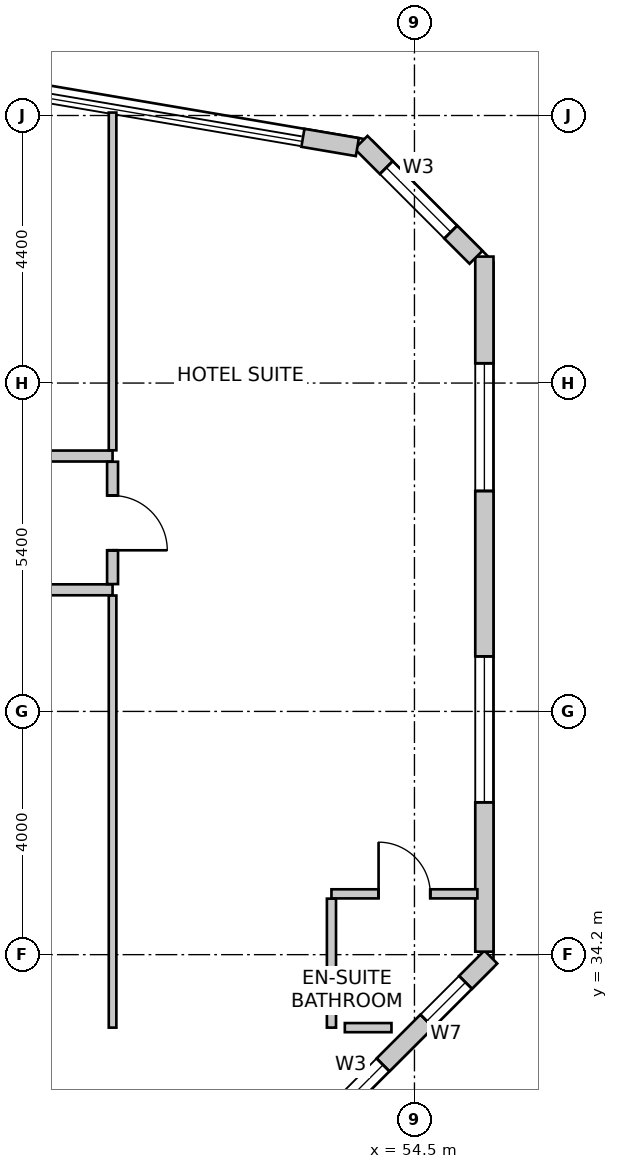
"""IFC4 building model, lengths in metres.
Left out: names, types, materials, properties, quantities, classifications, styles, units other than length and angle.
Written with IfcOpenShell. Run it as: python <this file> out.ifc"""

import sys

from ifc_helpers import new_model, si_unit, direction, frame, frame_2d, origin, place, context, subcontext, project, spatial, rectangle, extrude, source, transform, mapped, element, fill, save


model = new_model("IFC4")
c1 = context("Model", 3, precision=1e-05, world=origin(), true_north=direction((0.0, 1.0)))
c2 = subcontext(c1, "Body", "Model", "MODEL_VIEW")
j1 = project(units=[si_unit("LENGTHUNIT", "METRE"), si_unit("PLANEANGLEUNIT", "RADIAN")], contexts=[c1])
p1 = place(None, origin())
s1 = spatial("IfcSite", under=j1, at=p1, CompositionType="ELEMENT")
p2 = place(p1, origin())
s2 = spatial("IfcBuilding", under=s1, at=p2, CompositionType="ELEMENT")
p3 = place(p2, frame((0.0, 0.0, 153.8)))
s3 = spatial("IfcBuildingStorey", under=s2, at=p3, CompositionType="ELEMENT", Elevation=153.8)
p4 = place(p3, frame((52.476, 30.88, 0.0), z_axis=(0.0, 0.0, 1.0), x_axis=(0.707106781187, 0.707106781187, 0.0)))
e1 = element("IfcWall", 1, at=p4, inside=s3, PredefinedType="SOLIDWALL", context=c2, shape_type="SweptSolid", body=[
    extrude(rectangle(XDim=4.639, YDim=0.3, at=frame_2d((2.319, 0.0))), origin(), (0.0, 0.0, 1.0), 3.35),
])
m1 = source(origin(), c2, "Body", "SweptSolid", [
    extrude(rectangle(XDim=1.5, YDim=1.8, at=frame_2d((0.75, 0.9))), frame((0.0, 0.16, 0.0), z_axis=(0.0, -1.0, 0.0), x_axis=(1.0, 0.0, 0.0)), (0.0, 0.0, 1.0), 0.32),
])
p5 = place(p4, frame((0.632, 0.0, 0.85)))
e2 = element("IfcOpeningElement", 2, at=p5, cuts=e1, PredefinedType="OPENING", context=c2, shape_type="MappedRepresentation", body=[
    mapped(m1, transform((0.0, 0.0, 0.0), scale=1.0)),
])
m2 = source(origin(), c2, "Body", "SweptSolid", [
    extrude(rectangle(XDim=0.9, YDim=1.6, at=frame_2d((0.45, 0.8))), frame((0.0, 0.16, 0.0), z_axis=(0.0, -1.0, 0.0), x_axis=(1.0, 0.0, 0.0)), (0.0, 0.0, 1.0), 0.32),
])
p6 = place(p4, frame((3.151, 0.0, 0.85)))
e3 = element("IfcOpeningElement", 3, at=p6, cuts=e1, PredefinedType="OPENING", context=c2, shape_type="MappedRepresentation", body=[
    mapped(m2, transform((0.0, 0.0, 0.0), scale=1.0)),
])
p7 = place(p3, frame((55.65, 34.249, 0.0), z_axis=(0.0, 0.0, 1.0), x_axis=(0.0, 1.0, 0.0)))
e4 = element("IfcWall", 4, at=p7, inside=s3, PredefinedType="SOLIDWALL", context=c2, shape_type="SweptSolid", body=[
    extrude(rectangle(XDim=11.431, YDim=0.3, at=frame_2d((5.715, 0.0))), origin(), (0.0, 0.0, 1.0), 3.35),
])
m3 = source(origin(), c2, "Body", "SweptSolid", [
    extrude(rectangle(XDim=2.4, YDim=2.2, at=frame_2d((1.2, 1.1))), frame((0.0, 0.16, 0.0), z_axis=(0.0, -1.0, 0.0), x_axis=(1.0, 0.0, 0.0)), (0.0, 0.0, 1.0), 0.32),
])
p8 = place(p7, frame((2.456, 0.0, 0.85)))
e5 = element("IfcOpeningElement", 5, at=p8, cuts=e4, PredefinedType="OPENING", context=c2, shape_type="MappedRepresentation", body=[
    mapped(m3, transform((0.0, 0.0, 0.0), scale=1.0)),
])
m4 = source(origin(), c2, "Body", "SweptSolid", [
    extrude(rectangle(XDim=2.1, YDim=2.0, at=frame_2d((1.05, 1.0))), frame((0.0, 0.16, 0.0), z_axis=(0.0, -1.0, 0.0), x_axis=(1.0, 0.0, 0.0)), (0.0, 0.0, 1.0), 0.32),
])
p9 = place(p7, frame((7.576, 0.0, 0.85)))
e6 = element("IfcOpeningElement", 6, at=p9, cuts=e4, PredefinedType="OPENING", context=c2, shape_type="MappedRepresentation", body=[
    mapped(m4, transform((0.0, 0.0, 0.0), scale=1.0)),
])
p10 = place(p3, frame((55.512, 45.668, 0.0), z_axis=(0.0, 0.0, 1.0), x_axis=(-0.707152443695, 0.707061115729, 0.0)))
e7 = element("IfcWall", 7, at=p10, inside=s3, PredefinedType="SOLIDWALL", context=c2, shape_type="SweptSolid", body=[
    extrude(rectangle(XDim=2.673, YDim=0.3, at=frame_2d((1.337, 0.0))), origin(), (0.0, 0.0, 1.0), 3.35),
])
p11 = place(p10, frame((0.587, 0.0, 0.85)))
e8 = element("IfcOpeningElement", 8, at=p11, cuts=e7, PredefinedType="OPENING", context=c2, shape_type="MappedRepresentation", body=[
    mapped(m1, transform((0.0, 0.0, 0.0), scale=1.0)),
])
p12 = place(p3, frame((53.561, 47.48, 0.0), z_axis=(0.0, 0.0, 1.0), x_axis=(-0.985836300899, 0.167710428506, 0.0)))
e9 = element("IfcWall", 9, at=p12, inside=s3, PredefinedType="SOLIDWALL", context=c2, shape_type="SweptSolid", body=[
    extrude(rectangle(XDim=0.908, YDim=0.3, at=frame_2d((0.454, 0.0))), origin(), (0.0, 0.0, 1.0), 3.35),
])
p13 = place(p3, frame((41.829, 42.4, 0.0), z_axis=(0.0, 0.0, 1.0), x_axis=(1.0, 0.0, 0.0)))
e10 = element("IfcWall", 10, at=p13, inside=s3, PredefinedType="PARTITIONING", context=c2, shape_type="SweptSolid", body=[
    extrude(rectangle(XDim=7.706, YDim=0.18, at=frame_2d((3.853, 0.0))), origin(), (0.0, 0.0, 1.0), 2.803),
])
m5 = source(origin(), c2, "Body", "SweptSolid", [
    extrude(rectangle(XDim=0.9, YDim=2.15, at=frame_2d((0.45, 1.075))), frame((0.0, 0.1, 0.0), z_axis=(0.0, -1.0, 0.0), x_axis=(1.0, 0.0, 0.0)), (0.0, 0.0, 1.0), 0.2),
])
p14 = place(p13, frame((3.403, 0.0, 0.0)))
e11 = element("IfcOpeningElement", 11, at=p14, cuts=e10, PredefinedType="OPENING", context=c2, shape_type="MappedRepresentation", body=[
    mapped(m5, transform((0.0, 0.0, 0.0), scale=1.0)),
])
p15 = place(p3, frame((49.535, 40.2, 0.0), z_axis=(0.0, 0.0, 1.0), x_axis=(-1.0, 0.0, 0.0)))
e12 = element("IfcWall", 12, at=p15, inside=s3, PredefinedType="PARTITIONING", context=c2, shape_type="SweptSolid", body=[
    extrude(rectangle(XDim=7.706, YDim=0.18, at=frame_2d((3.853, 0.0))), origin(), (0.0, 0.0, 1.0), 2.803),
])
p16 = place(p15, frame((3.403, 0.0, 0.0)))
e13 = element("IfcOpeningElement", 13, at=p16, cuts=e12, PredefinedType="OPENING", context=c2, shape_type="MappedRepresentation", body=[
    mapped(m5, transform((0.0, 0.0, 0.0), scale=1.0)),
])
p17 = place(p3, frame((49.535, 42.306, 0.0), z_axis=(0.0, 0.0, 1.0), x_axis=(0.0, -1.0, 0.0)))
e14 = element("IfcWall", 14, at=p17, inside=s3, PredefinedType="PARTITIONING", context=c2, shape_type="SweptSolid", body=[
    extrude(rectangle(XDim=2.012, YDim=0.18, at=frame_2d((1.006, 0.0))), origin(), (0.0, 0.0, 1.0), 3.35),
])
p18 = place(p17, frame((0.556, 0.0, 0.0)))
e15 = element("IfcOpeningElement", 15, at=p18, cuts=e14, PredefinedType="OPENING", context=c2, shape_type="MappedRepresentation", body=[
    mapped(m5, transform((0.0, 0.0, 0.0), scale=1.0)),
])
p19 = place(p3, frame((49.535, 48.049, 0.0), z_axis=(0.0, 0.0, 1.0), x_axis=(0.0, -1.0, 0.0)))
e16 = element("IfcWall", 16, at=p19, inside=s3, PredefinedType="PARTITIONING", context=c2, shape_type="SweptSolid", body=[
    extrude(rectangle(XDim=5.555, YDim=0.125, at=frame_2d((2.777, 0.0))), origin(), (0.0, 0.0, 1.0), 3.35),
])
p20 = place(p3, frame((49.535, 40.106, 0.0), z_axis=(0.0, 0.0, 1.0), x_axis=(0.0, -1.0, 0.0)))
e17 = element("IfcWall", 17, at=p20, inside=s3, PredefinedType="PARTITIONING", context=c2, shape_type="SweptSolid", body=[
    extrude(rectangle(XDim=7.106, YDim=0.125, at=frame_2d((3.553, 0.0))), origin(), (0.0, 0.0, 1.0), 3.35),
])
p21 = place(p3, frame((53.135, 35.2, 0.0), z_axis=(0.0, 0.0, 1.0), x_axis=(1.0, 0.0, 0.0)))
e18 = element("IfcWall", 18, at=p21, inside=s3, PredefinedType="PARTITIONING", context=c2, shape_type="SweptSolid", body=[
    extrude(rectangle(XDim=2.4, YDim=0.15, at=frame_2d((1.2, 0.0))), origin(), (0.0, 0.0, 1.0), 3.35),
])
m6 = source(origin(), c2, "Body", "SweptSolid", [
    extrude(rectangle(XDim=0.85, YDim=2.15, at=frame_2d((0.425, 1.075))), frame((0.0, 0.085, 0.0), z_axis=(0.0, -1.0, 0.0), x_axis=(1.0, 0.0, 0.0)), (0.0, 0.0, 1.0), 0.17),
])
p22 = place(p21, frame((0.775, 0.0, 0.0)))
e19 = element("IfcOpeningElement", 19, at=p22, cuts=e18, PredefinedType="OPENING", context=c2, shape_type="MappedRepresentation", body=[
    mapped(m6, transform((0.0, 0.0, 0.0), scale=1.0)),
])
p23 = place(p3, frame((53.135, 33.0, 0.0), z_axis=(0.0, 0.0, 1.0), x_axis=(0.0, 1.0, 0.0)))
e20 = element("IfcWall", 20, at=p23, inside=s3, PredefinedType="PARTITIONING", context=c2, shape_type="SweptSolid", body=[
    extrude(rectangle(XDim=2.121, YDim=0.15, at=frame_2d((1.061, 0.0))), origin(), (0.0, 0.0, 1.0), 3.35),
])
p24 = place(p3, frame((54.122, 33.0, 0.0), z_axis=(0.0, 0.0, 1.0), x_axis=(-1.0, 0.0, 0.0)))
e21 = element("IfcWall", 21, at=p24, inside=s3, PredefinedType="PARTITIONING", context=c2, shape_type="SweptSolid", body=[
    extrude(rectangle(XDim=0.767, YDim=0.15, at=frame_2d((0.384, 0.0))), origin(), (0.0, 0.0, 1.0), 3.35),
])
m7 = source(origin(), c2, "Body", "SweptSolid", [
    extrude(rectangle(XDim=1.5, YDim=1.8, at=frame_2d((0.75, 0.9))), frame((0.0, -0.015, 0.0), z_axis=(0.0, -1.0, 0.0), x_axis=(1.0, 0.0, 0.0)), (0.0, 0.0, 1.0), 0.06),
])
p25 = place(p5, origin())
e22 = element("IfcWindow", 22, at=p25, inside=s3, PartitioningType="SINGLE_PANEL", PredefinedType="WINDOW", context=c2, shape_type="MappedRepresentation", body=[
    mapped(m7, transform((0.0, 0.0, 0.0), scale=1.0)),
])
fill(e2, e22)
m8 = source(origin(), c2, "Body", "SweptSolid", [
    extrude(rectangle(XDim=0.9, YDim=1.6, at=frame_2d((0.45, 0.8))), frame((0.0, -0.015, 0.0), z_axis=(0.0, -1.0, 0.0), x_axis=(1.0, 0.0, 0.0)), (0.0, 0.0, 1.0), 0.06),
])
p26 = place(p6, origin())
e23 = element("IfcWindow", 23, at=p26, inside=s3, PartitioningType="SINGLE_PANEL", PredefinedType="WINDOW", context=c2, shape_type="MappedRepresentation", body=[
    mapped(m8, transform((0.0, 0.0, 0.0), scale=1.0)),
])
fill(e3, e23)
m9 = source(origin(), c2, "Body", "SweptSolid", [
    extrude(rectangle(XDim=2.4, YDim=2.2, at=frame_2d((1.2, 1.1))), frame((0.0, -0.015, 0.0), z_axis=(0.0, -1.0, 0.0), x_axis=(1.0, 0.0, 0.0)), (0.0, 0.0, 1.0), 0.06),
])
p27 = place(p8, origin())
e24 = element("IfcWindow", 24, at=p27, inside=s3, PartitioningType="SINGLE_PANEL", PredefinedType="WINDOW", context=c2, shape_type="MappedRepresentation", body=[
    mapped(m9, transform((0.0, 0.0, 0.0), scale=1.0)),
])
fill(e5, e24)
m10 = source(origin(), c2, "Body", "SweptSolid", [
    extrude(rectangle(XDim=2.1, YDim=2.0, at=frame_2d((1.05, 1.0))), frame((0.0, -0.015, 0.0), z_axis=(0.0, -1.0, 0.0), x_axis=(1.0, 0.0, 0.0)), (0.0, 0.0, 1.0), 0.06),
])
p28 = place(p9, origin())
e25 = element("IfcWindow", 25, at=p28, inside=s3, PartitioningType="SINGLE_PANEL", PredefinedType="WINDOW", context=c2, shape_type="MappedRepresentation", body=[
    mapped(m10, transform((0.0, 0.0, 0.0), scale=1.0)),
])
fill(e6, e25)
p29 = place(p11, origin())
e26 = element("IfcWindow", 26, at=p29, inside=s3, PartitioningType="SINGLE_PANEL", PredefinedType="WINDOW", context=c2, shape_type="MappedRepresentation", body=[
    mapped(m7, transform((0.0, 0.0, 0.0), scale=1.0)),
])
fill(e8, e26)
m11 = source(origin(), c2, "Body", "SweptSolid", [
    extrude(rectangle(XDim=0.85, YDim=2.15, at=frame_2d((0.425, 1.075))), frame((0.0, 0.025, 0.0), z_axis=(0.0, -1.0, 0.0), x_axis=(1.0, 0.0, 0.0)), (0.0, 0.0, 1.0), 0.05),
])
p30 = place(p22, origin())
e27 = element("IfcDoor", 27, at=p30, inside=s3, OperationType="SINGLE_SWING_LEFT", PredefinedType="DOOR", context=c2, shape_type="MappedRepresentation", body=[
    mapped(m11, transform((0.0, 0.0, 0.0), scale=1.0)),
])
fill(e19, e27)
m12 = source(origin(), c2, "Body", "SweptSolid", [
    extrude(rectangle(XDim=0.9, YDim=2.15, at=frame_2d((0.45, 1.075))), frame((0.0, 0.025, 0.0), z_axis=(0.0, -1.0, 0.0), x_axis=(1.0, 0.0, 0.0)), (0.0, 0.0, 1.0), 0.05),
])
p31 = place(p18, origin())
e28 = element("IfcDoor", 28, at=p31, inside=s3, OperationType="SINGLE_SWING_RIGHT", PredefinedType="DOOR", context=c2, shape_type="MappedRepresentation", body=[
    mapped(m12, transform((0.0, 0.0, 0.0), scale=1.0)),
])
fill(e15, e28)
save(model, sys.argv[1])
